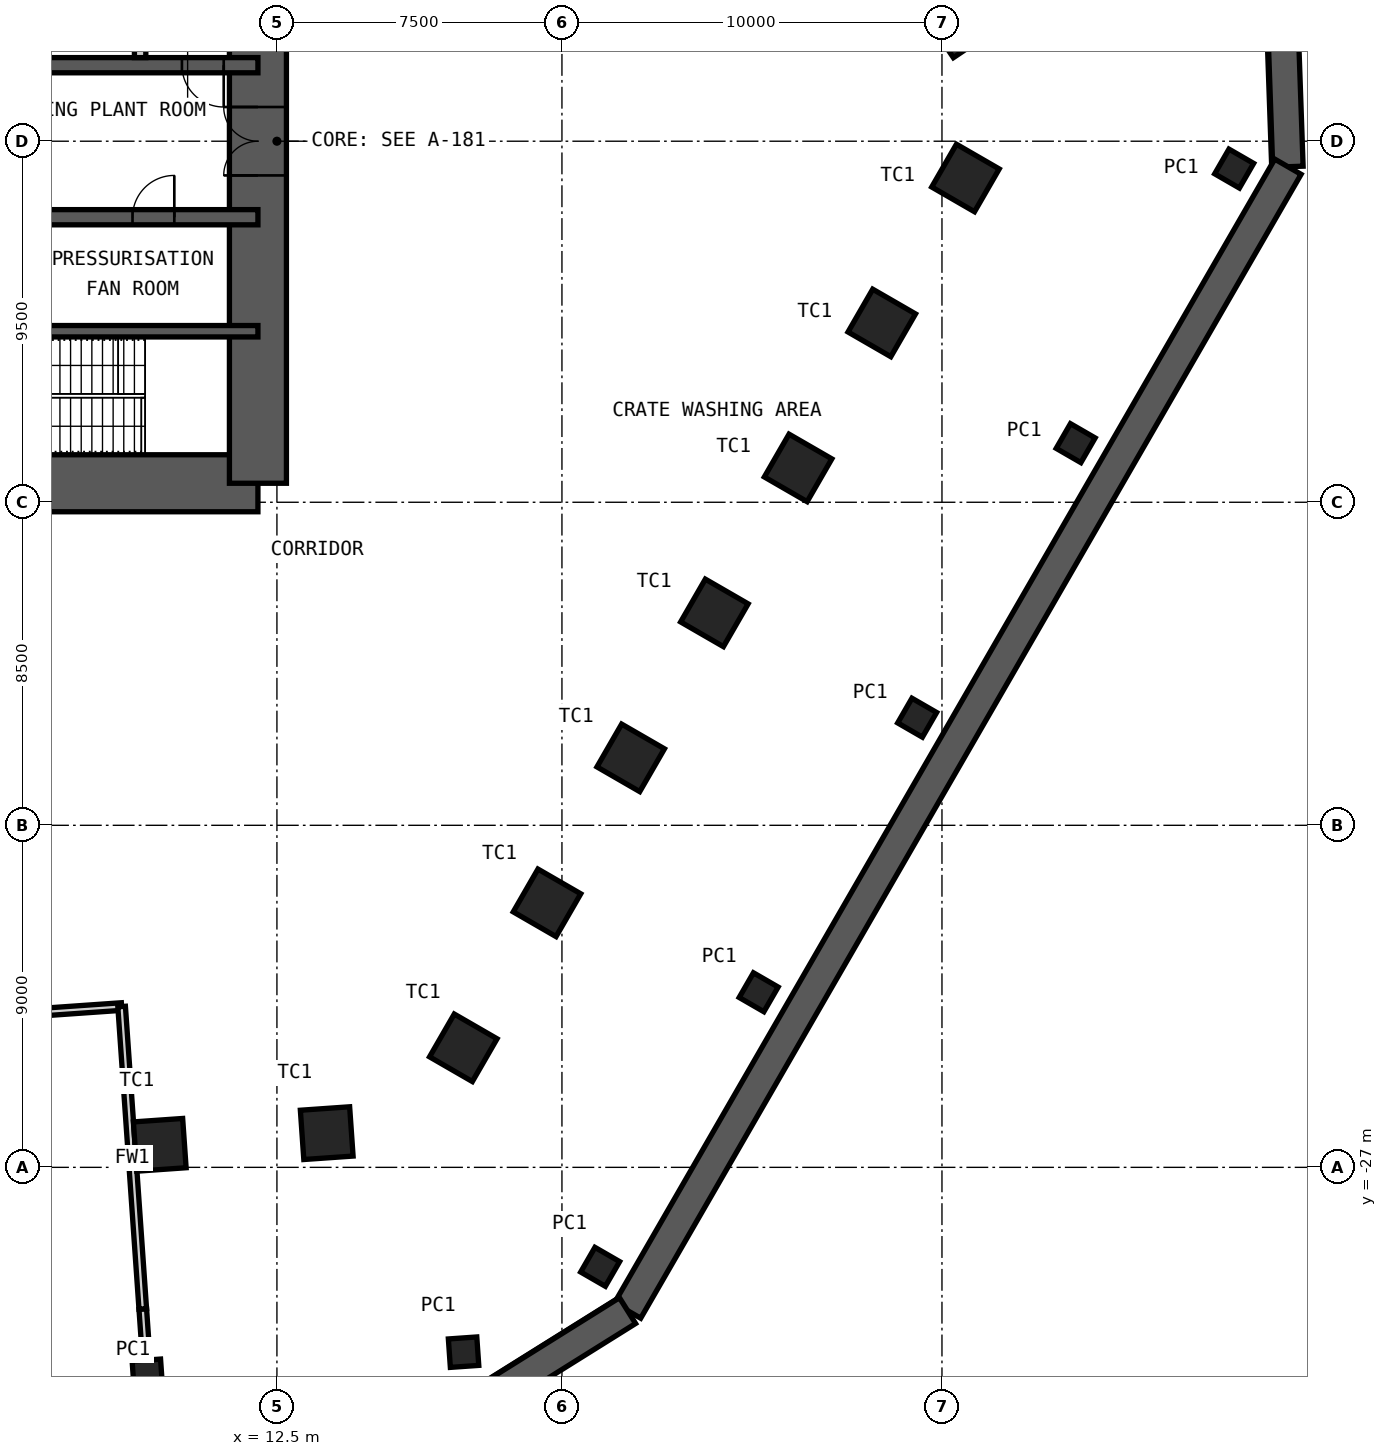
"""IFC4 building model, lengths in metres.
Left out: names, types, materials, properties, quantities, classifications, styles, units other than length and angle.
Written with IfcOpenShell. Run it as: python <this file> out.ifc"""

import sys

from ifc_helpers import new_model, si_unit, direction, frame, frame_2d, origin, origin_2d, place, context, subcontext, project, spatial, rectangle, hollow_rectangle, extrude, element, fill, save


model = new_model("IFC4")
c1 = context("Model", 3, precision=1e-05, world=origin(), true_north=direction((0.0, 1.0)))
c2 = subcontext(c1, "Body", "Model", "MODEL_VIEW")
j1 = project(units=[si_unit("LENGTHUNIT", "METRE"), si_unit("PLANEANGLEUNIT", "RADIAN")], contexts=[c1])
p1 = place(None, origin())
s1 = spatial("IfcSite", under=j1, at=p1, CompositionType="ELEMENT")
p2 = place(p1, origin())
s2 = spatial("IfcBuilding", under=s1, at=p2, CompositionType="ELEMENT")
p3 = place(p2, frame((0.0, 0.0, -6.0)))
s3 = spatial("IfcBuildingStorey", under=s2, at=p3, CompositionType="ELEMENT", Elevation=-6.0)
p4 = place(p3, frame((38.961, 3.397, 0.0), z_axis=(0.0, 0.0, 1.0), x_axis=(0.034904306503, -0.999390659046, 0.0)))
e1 = element("IfcWall", 1, at=p4, inside=s3, PredefinedType="SHEAR", context=c2, shape_type="SweptSolid", body=[
    extrude(rectangle(XDim=4.071, YDim=0.8, at=frame_2d((2.035, 0.0))), origin(), (0.0, 0.0, 1.0), 6.0),
])
p5 = place(p3, frame((39.103, -0.671, 0.0), z_axis=(0.0, 0.0, 1.0), x_axis=(-0.499999733485, -0.866025557657, 0.0)))
e2 = element("IfcWall", 2, at=p5, inside=s3, PredefinedType="SHEAR", context=c2, shape_type="SweptSolid", body=[
    extrude(rectangle(XDim=34.755, YDim=0.8, at=frame_2d((17.377, 0.0))), origin(), (0.0, 0.0, 1.0), 6.0),
])
p6 = place(p3, frame((21.726, -30.77, 0.0), z_axis=(0.0, 0.0, 1.0), x_axis=(-0.848056550838, -0.529905733675, 0.0)))
e3 = element("IfcWall", 3, at=p6, inside=s3, PredefinedType="SHEAR", context=c2, shape_type="SweptSolid", body=[
    extrude(rectangle(XDim=4.238, YDim=0.8, at=frame_2d((2.119, 0.0))), origin(), (0.0, 0.0, 1.0), 6.0),
])
for number, where, z_axis, x_axis in (
    (4, (30.476, 3.101, 0.0), (0.0, 0.0, 1.0), (-0.559, 0.829, 0.0)),
    (5, (30.618, -0.967, 0.0), (0.0, 0.0, 1.0), (0.5, 0.866, 0.0)),
    (6, (28.416, -4.782, 0.0), (0.0, 0.0, 1.0), (0.5, 0.866, 0.0)),
    (7, (26.214, -8.596, 0.0), (0.0, 0.0, 1.0), (0.5, 0.866, 0.0)),
    (8, (24.011, -12.411, 0.0), (0.0, 0.0, 1.0), (0.5, 0.866, 0.0)),
    (9, (21.809, -16.225, 0.0), (0.0, 0.0, 1.0), (0.5, 0.866, 0.0)),
    (10, (19.607, -20.04, 0.0), (0.0, 0.0, 1.0), (0.5, 0.866, 0.0)),
    (11, (17.405, -23.854, 0.0), (0.0, 0.0, 1.0), (0.5, 0.866, 0.0)),
    (12, (13.811, -26.1, 0.0), (0.0, 0.0, 1.0), (0.998, 0.07, 0.0)),
    (13, (9.417, -26.407, 0.0), (0.0, 0.0, 1.0), (0.998, 0.07, 0.0)),
):
    element("IfcColumn", number, at=place(p3, frame(where, z_axis=z_axis, x_axis=x_axis)), inside=s3, PredefinedType="COLUMN", context=c2, shape_type="SweptSolid", body=[
        extrude(hollow_rectangle(XDim=1.3, YDim=1.3, WallThickness=0.1, at=origin_2d()), origin(), (0.0, 0.0, 1.0), 6.0),
    ])
for number, where, z_axis, x_axis in (
    (14, (37.689, -0.72, 0.0), (0.0, 0.0, 1.0), (0.5, 0.866, 0.0)),
    (15, (33.518, -7.945, 0.0), (0.0, 0.0, 1.0), (0.5, 0.866, 0.0)),
    (16, (29.347, -15.169, 0.0), (0.0, 0.0, 1.0), (0.5, 0.866, 0.0)),
    (17, (25.177, -22.393, 0.0), (0.0, 0.0, 1.0), (0.5, 0.866, 0.0)),
    (18, (17.411, -31.863, 0.0), (0.0, 0.0, 1.0), (0.998, 0.07, 0.0)),
    (19, (9.09, -32.445, 0.0), (0.0, 0.0, 1.0), (0.998, 0.07, 0.0)),
    (20, (21.006, -29.617, 0.0), (0.0, 0.0, 1.0), (0.5, 0.866, 0.0)),
):
    element("IfcColumn", number, at=place(p3, frame(where, z_axis=z_axis, x_axis=x_axis)), inside=s3, PredefinedType="COLUMN", context=c2, shape_type="SweptSolid", body=[
        extrude(hollow_rectangle(XDim=0.75, YDim=0.75, WallThickness=0.036, at=origin_2d()), origin(), (0.0, 0.0, 1.0), 6.0),
    ])
p7 = place(p3, frame((-12.0, -9.0, 0.0), z_axis=(0.0, 0.0, 1.0), x_axis=(1.0, 0.0, 0.0)))
e21 = element("IfcWall", 21, at=p7, inside=s3, PredefinedType="SHEAR", context=c2, shape_type="SweptSolid", body=[
    extrude(rectangle(XDim=24.0, YDim=1.5, at=frame_2d((12.0, 0.0))), origin(), (0.0, 0.0, 1.0), 6.0),
])
p8 = place(p7, frame((1.35, 0.0, 0.0)))
e22 = element("IfcOpeningElement", 22, at=p8, cuts=e21, PredefinedType="OPENING", context=c2, shape_type="SweptSolid", body=[
    extrude(rectangle(XDim=1.0, YDim=2.1, at=frame_2d((0.5, 1.05))), frame((0.0, 0.76, 0.0), z_axis=(0.0, -1.0, 0.0), x_axis=(1.0, 0.0, 0.0)), (0.0, 0.0, 1.0), 1.52),
])
p9 = place(p7, frame((5.325, 0.0, 0.0)))
e23 = element("IfcOpeningElement", 23, at=p9, cuts=e21, PredefinedType="OPENING", context=c2, shape_type="SweptSolid", body=[
    extrude(rectangle(XDim=1.15, YDim=2.1, at=frame_2d((0.575, 1.05))), frame((0.0, 0.76, 0.0), z_axis=(0.0, -1.0, 0.0), x_axis=(1.0, 0.0, 0.0)), (0.0, 0.0, 1.0), 1.52),
])
p10 = place(p7, frame((12.6, 0.0, 0.0)))
e24 = element("IfcOpeningElement", 24, at=p10, cuts=e21, PredefinedType="OPENING", context=c2, shape_type="SweptSolid", body=[
    extrude(rectangle(XDim=1.0, YDim=2.1, at=frame_2d((0.5, 1.05))), frame((0.0, 0.76, 0.0), z_axis=(0.0, -1.0, 0.0), x_axis=(1.0, 0.0, 0.0)), (0.0, 0.0, 1.0), 1.52),
])
p11 = place(p3, frame((12.0, -9.0, 0.0), z_axis=(0.0, 0.0, 1.0), x_axis=(0.0, 1.0, 0.0)))
e25 = element("IfcWall", 25, at=p11, inside=s3, PredefinedType="SHEAR", context=c2, shape_type="SweptSolid", body=[
    extrude(rectangle(XDim=18.0, YDim=1.5, at=frame_2d((9.0, 0.0))), origin(), (0.0, 0.0, 1.0), 6.0),
])
p12 = place(p11, frame((8.1, 0.0, 0.0)))
e26 = element("IfcOpeningElement", 26, at=p12, cuts=e25, PredefinedType="OPENING", context=c2, shape_type="SweptSolid", body=[
    extrude(rectangle(XDim=1.8, YDim=2.1, at=frame_2d((0.9, 1.05))), frame((0.0, 0.76, 0.0), z_axis=(0.0, -1.0, 0.0), x_axis=(1.0, 0.0, 0.0)), (0.0, 0.0, 1.0), 1.52),
])
p13 = place(p3, frame((-12.0, 2.0, 0.0), z_axis=(0.0, 0.0, 1.0), x_axis=(1.0, 0.0, 0.0)))
e27 = element("IfcWall", 27, at=p13, inside=s3, PredefinedType="SHEAR", context=c2, shape_type="SweptSolid", body=[
    extrude(rectangle(XDim=24.0, YDim=0.4, at=frame_2d((12.0, 0.0))), origin(), (0.0, 0.0, 1.0), 6.0),
])
p14 = place(p13, frame((2.4, 0.0, 0.0)))
e28 = element("IfcOpeningElement", 28, at=p14, cuts=e27, PredefinedType="OPENING", context=c2, shape_type="SweptSolid", body=[
    extrude(rectangle(XDim=1.1, YDim=2.1, at=frame_2d((0.55, 1.05))), frame((0.0, 0.21, 0.0), z_axis=(0.0, -1.0, 0.0), x_axis=(1.0, 0.0, 0.0)), (0.0, 0.0, 1.0), 0.42),
])
p15 = place(p13, frame((22.0, 0.0, 0.0)))
e29 = element("IfcOpeningElement", 29, at=p15, cuts=e27, PredefinedType="OPENING", context=c2, shape_type="SweptSolid", body=[
    extrude(rectangle(XDim=1.1, YDim=2.1, at=frame_2d((0.55, 1.05))), frame((0.0, 0.21, 0.0), z_axis=(0.0, -1.0, 0.0), x_axis=(1.0, 0.0, 0.0)), (0.0, 0.0, 1.0), 0.42),
])
p16 = place(p13, frame((10.15, 0.0, 0.0)))
e30 = element("IfcOpeningElement", 30, at=p16, cuts=e27, PredefinedType="OPENING", context=c2, shape_type="SweptSolid", body=[
    extrude(rectangle(XDim=1.0, YDim=2.1, at=frame_2d((0.5, 1.05))), frame((0.0, 0.21, 0.0), z_axis=(0.0, -1.0, 0.0), x_axis=(1.0, 0.0, 0.0)), (0.0, 0.0, 1.0), 0.42),
])
p17 = place(p13, frame((6.7, 0.0, 0.0)))
e31 = element("IfcOpeningElement", 31, at=p17, cuts=e27, PredefinedType="OPENING", context=c2, shape_type="SweptSolid", body=[
    extrude(rectangle(XDim=1.4, YDim=2.4, at=frame_2d((0.7, 1.2))), frame((0.0, 0.21, 0.0), z_axis=(0.0, -1.0, 0.0), x_axis=(1.0, 0.0, 0.0)), (0.0, 0.0, 1.0), 0.42),
])
p18 = place(p3, frame((-12.0, -2.0, 0.0), z_axis=(0.0, 0.0, 1.0), x_axis=(1.0, 0.0, 0.0)))
e32 = element("IfcWall", 32, at=p18, inside=s3, PredefinedType="SHEAR", context=c2, shape_type="SweptSolid", body=[
    extrude(rectangle(XDim=24.0, YDim=0.4, at=frame_2d((12.0, 0.0))), origin(), (0.0, 0.0, 1.0), 6.0),
])
p19 = place(p18, frame((1.1, 0.0, 0.0)))
e33 = element("IfcOpeningElement", 33, at=p19, cuts=e32, PredefinedType="OPENING", context=c2, shape_type="SweptSolid", body=[
    extrude(rectangle(XDim=1.1, YDim=2.1, at=frame_2d((0.55, 1.05))), frame((0.0, 0.21, 0.0), z_axis=(0.0, -1.0, 0.0), x_axis=(1.0, 0.0, 0.0)), (0.0, 0.0, 1.0), 0.42),
])
p20 = place(p18, frame((13.55, 0.0, 0.0)))
e34 = element("IfcOpeningElement", 34, at=p20, cuts=e32, PredefinedType="OPENING", context=c2, shape_type="SweptSolid", body=[
    extrude(rectangle(XDim=1.1, YDim=2.1, at=frame_2d((0.55, 1.05))), frame((0.0, 0.21, 0.0), z_axis=(0.0, -1.0, 0.0), x_axis=(1.0, 0.0, 0.0)), (0.0, 0.0, 1.0), 0.42),
])
p21 = place(p18, frame((20.7, 0.0, 0.0)))
e35 = element("IfcOpeningElement", 35, at=p21, cuts=e32, PredefinedType="OPENING", context=c2, shape_type="SweptSolid", body=[
    extrude(rectangle(XDim=1.1, YDim=2.1, at=frame_2d((0.55, 1.05))), frame((0.0, 0.21, 0.0), z_axis=(0.0, -1.0, 0.0), x_axis=(1.0, 0.0, 0.0)), (0.0, 0.0, 1.0), 0.42),
])
p22 = place(p3, frame((-12.0, -5.0, 0.0), z_axis=(0.0, 0.0, 1.0), x_axis=(1.0, 0.0, 0.0)))
e36 = element("IfcWall", 36, at=p22, inside=s3, PredefinedType="SHEAR", context=c2, shape_type="SweptSolid", body=[
    extrude(rectangle(XDim=24.0, YDim=0.3, at=frame_2d((12.0, 0.0))), origin(), (0.0, 0.0, 1.0), 6.0),
])
p23 = place(p3, frame((8.9, 2.2, 0.0), z_axis=(0.0, 0.0, 1.0), x_axis=(0.0, 1.0, 0.0)))
e37 = element("IfcWall", 37, at=p23, inside=s3, PredefinedType="PARTITIONING", context=c2, shape_type="SweptSolid", body=[
    extrude(rectangle(XDim=2.65, YDim=0.3, at=frame_2d((1.325, 0.0))), origin(), (0.0, 0.0, 1.0), 5.78),
])
p24 = place(p3, frame((9.146, -33.243, 0.0), z_axis=(0.0, 0.0, 1.0), x_axis=(-0.069554756913, 0.997578135181, 0.0)))
e38 = element("IfcWall", 38, at=p24, inside=s3, PredefinedType="PARTITIONING", context=c2, shape_type="SweptSolid", body=[
    extrude(rectangle(XDim=0.779, YDim=0.2, at=frame_2d((0.39, 0.0))), origin(), (0.0, 0.0, 1.0), 5.75),
])
p25 = place(p3, frame((8.413, -22.769, 0.0), z_axis=(0.0, 0.0, 1.0), x_axis=(-0.997563888187, -0.069758791459, 0.0)))
e39 = element("IfcWall", 39, at=p25, inside=s3, PredefinedType="PARTITIONING", context=c2, shape_type="SweptSolid", body=[
    extrude(rectangle(XDim=16.683, YDim=0.2, at=frame_2d((8.342, 0.0))), origin(), (0.0, 0.0, 1.0), 5.75),
])
p26 = place(p25, frame((7.342, 0.0, 0.0)))
e40 = element("IfcOpeningElement", 40, at=p26, cuts=e39, PredefinedType="OPENING", context=c2, shape_type="SweptSolid", body=[
    extrude(rectangle(XDim=2.0, YDim=2.4, at=frame_2d((1.0, 1.2))), frame((0.0, 0.11, 0.0), z_axis=(0.0, -1.0, 0.0), x_axis=(1.0, 0.0, 0.0)), (0.0, 0.0, 1.0), 0.22),
])
p27 = place(p3, frame((9.092, -32.466, 0.0), z_axis=(0.0, 0.0, 1.0), x_axis=(-0.069873717935, 0.997555844824, 0.0)))
e41 = element("IfcWall", 41, at=p27, inside=s3, PredefinedType="PARTITIONING", context=c2, shape_type="SweptSolid", body=[
    extrude(rectangle(XDim=1.743, YDim=0.2, at=frame_2d((0.872, 0.0))), origin(), (0.0, 0.0, 1.0), 4.65),
])
p28 = place(p3, frame((8.97, -30.726, 0.0), z_axis=(0.0, 0.0, 1.0), x_axis=(-0.069748420123, 0.997564613391, 0.0)))
e42 = element("IfcWall", 42, at=p28, inside=s3, PredefinedType="PARTITIONING", context=c2, shape_type="SweptSolid", body=[
    extrude(rectangle(XDim=7.977, YDim=0.2, at=frame_2d((3.989, 0.0))), origin(), (0.0, 0.0, 1.0), 5.75),
])
p29 = place(p15, origin())
e43 = element("IfcDoor", 43, at=p29, inside=s3, OperationType="SINGLE_SWING_RIGHT", PredefinedType="DOOR", context=c2, shape_type="SweptSolid", body=[
    extrude(rectangle(XDim=1.1, YDim=2.1, at=frame_2d((0.55, 1.05))), frame((0.0, 0.025, 0.0), z_axis=(0.0, -1.0, 0.0), x_axis=(1.0, 0.0, 0.0)), (0.0, 0.0, 1.0), 0.05),
])
fill(e29, e43)
p30 = place(p21, origin())
e44 = element("IfcDoor", 44, at=p30, inside=s3, OperationType="SINGLE_SWING_LEFT", PredefinedType="DOOR", context=c2, shape_type="SweptSolid", body=[
    extrude(rectangle(XDim=1.1, YDim=2.1, at=frame_2d((0.55, 1.05))), frame((0.0, 0.025, 0.0), z_axis=(0.0, -1.0, 0.0), x_axis=(1.0, 0.0, 0.0)), (0.0, 0.0, 1.0), 0.05),
])
fill(e35, e44)
p31 = place(p12, origin())
e45 = element("IfcDoor", 45, at=p31, inside=s3, OperationType="DOUBLE_DOOR_DOUBLE_SWING", PredefinedType="DOOR", context=c2, shape_type="SweptSolid", body=[
    extrude(rectangle(XDim=1.8, YDim=2.1, at=frame_2d((0.9, 1.05))), frame((0.0, 0.025, 0.0), z_axis=(0.0, -1.0, 0.0), x_axis=(1.0, 0.0, 0.0)), (0.0, 0.0, 1.0), 0.05),
])
fill(e26, e45)
save(model, sys.argv[1])
